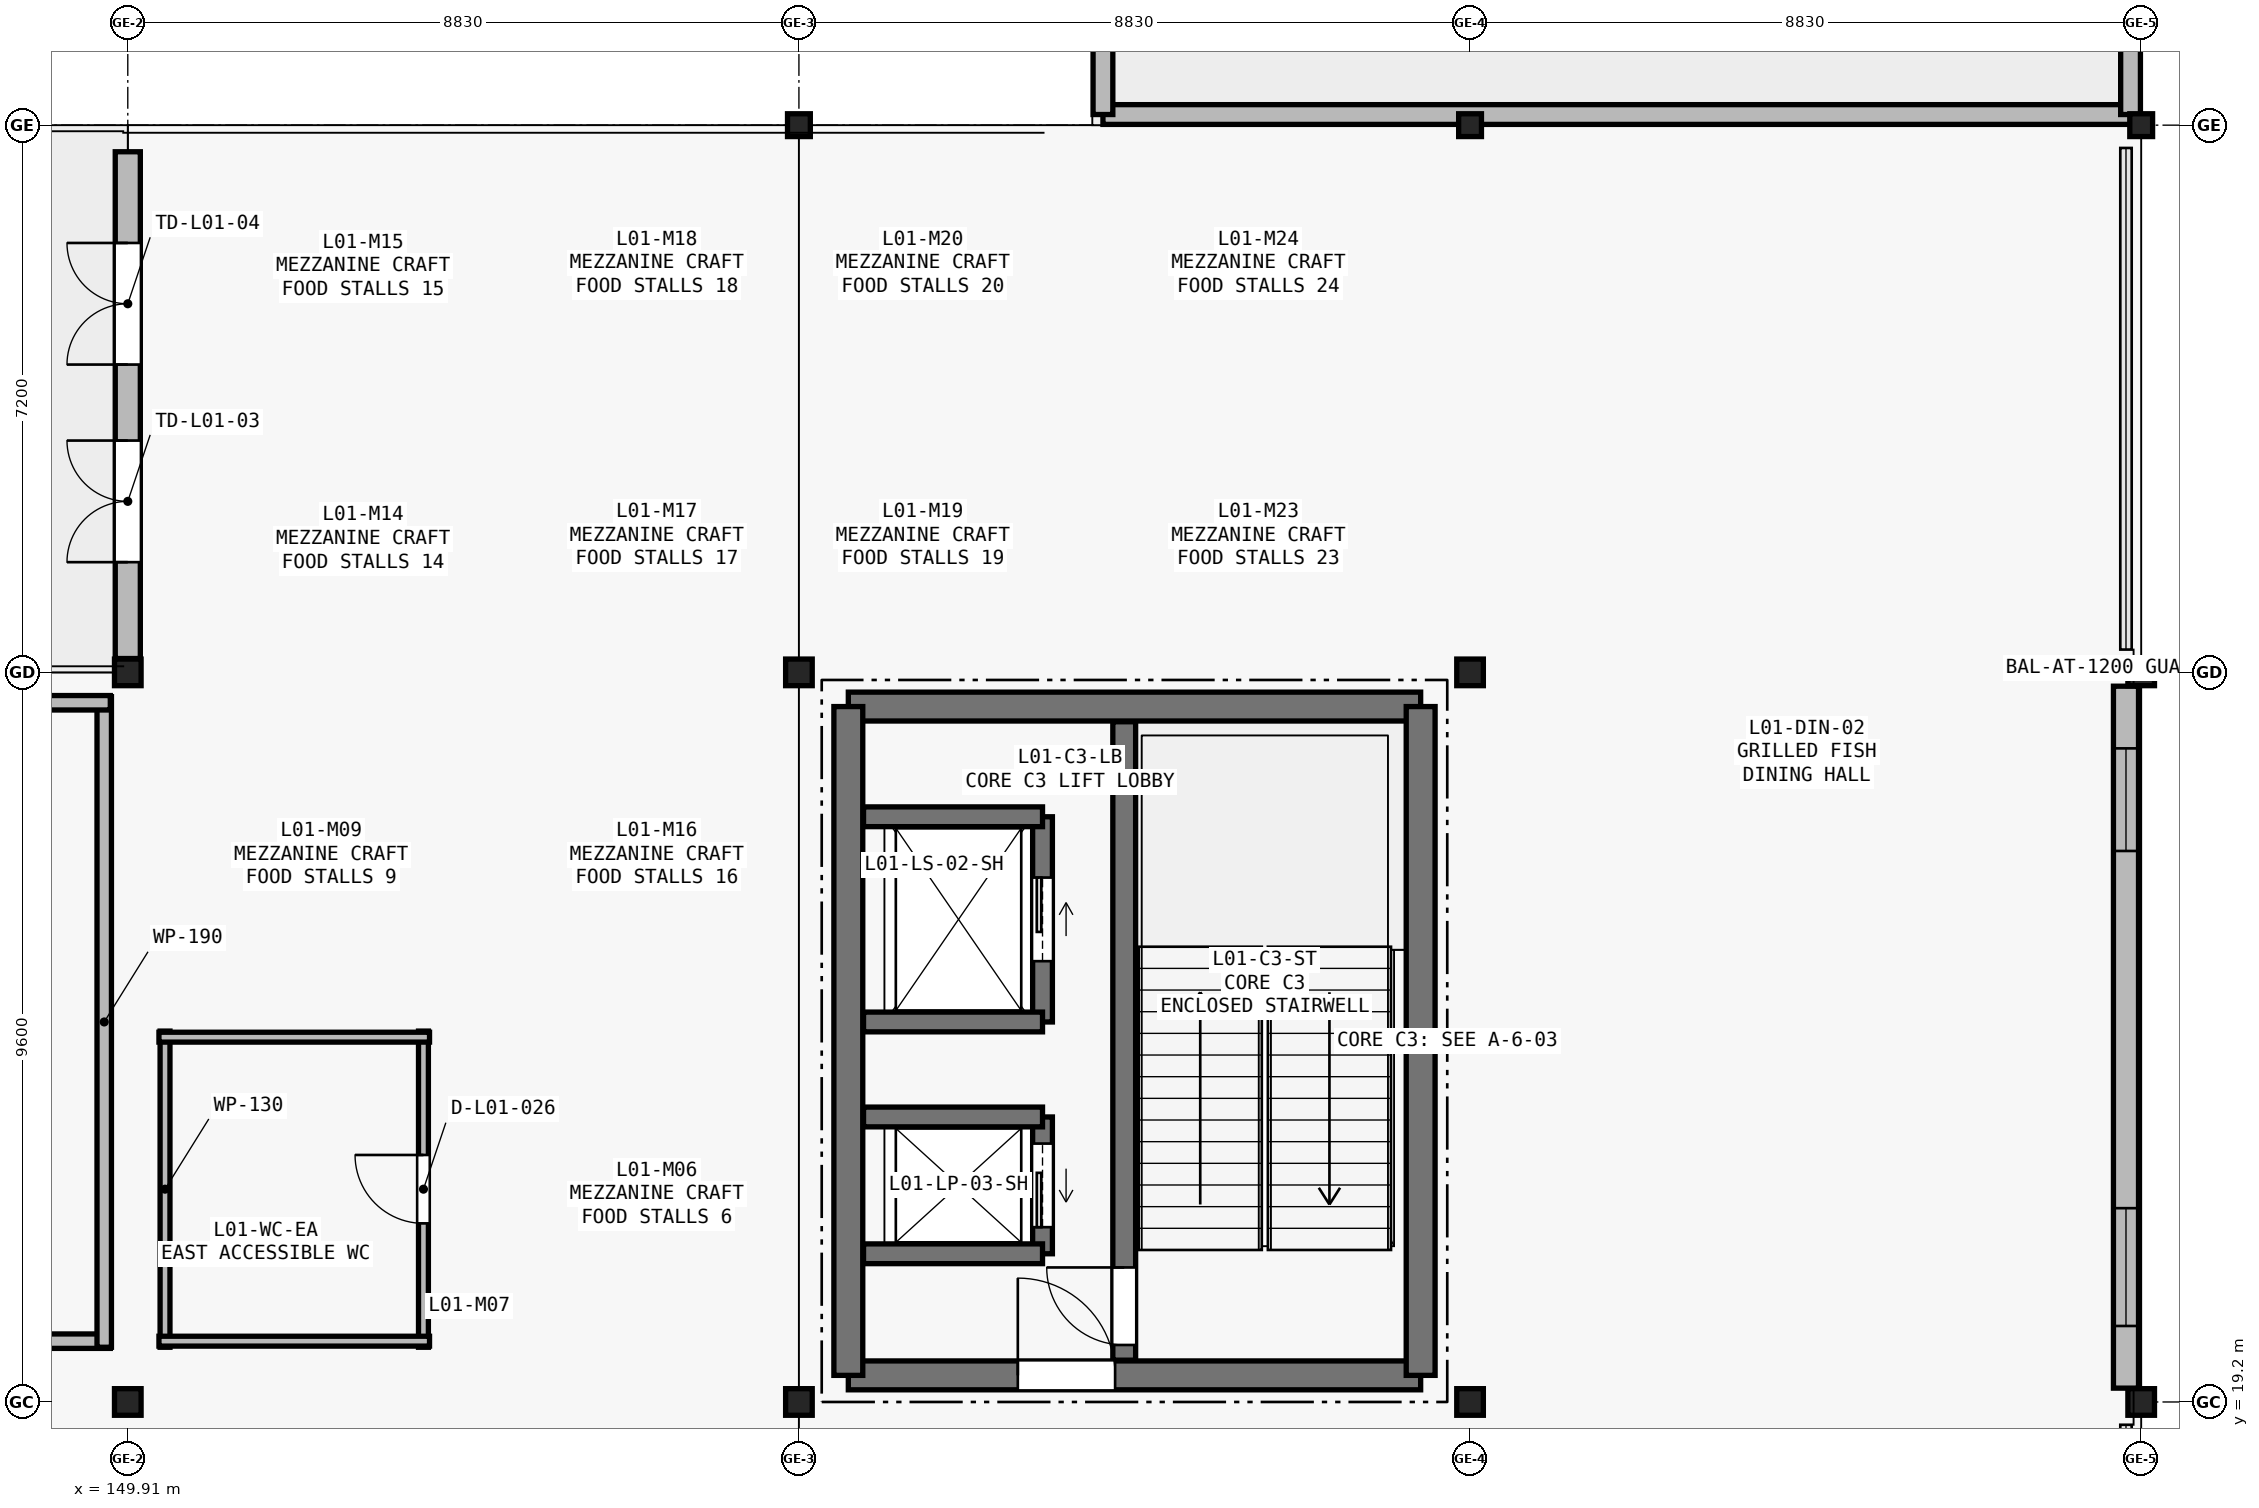
"""IFC4 building model, lengths in metres.
Left out: names, types, materials, properties, quantities, classifications, styles, units other than length and angle.
Written with IfcOpenShell. Run it as: python <this file> out.ifc"""

import sys

from ifc_helpers import new_model, si_unit, direction, frame, frame_2d, origin, origin_2d, place, context, subcontext, project, spatial, rectangle, hollow_rectangle, i_section, extrude, element, fill, save


model = new_model("IFC4")
c1 = context("Model", 3, precision=1e-05, world=origin(), true_north=direction((0.0, 1.0)))
c2 = subcontext(c1, "Body", "Model", "MODEL_VIEW")
j1 = project(units=[si_unit("LENGTHUNIT", "METRE"), si_unit("PLANEANGLEUNIT", "RADIAN")], contexts=[c1])
p1 = place(None, origin())
s1 = spatial("IfcSite", under=j1, at=p1, CompositionType="ELEMENT")
p2 = place(p1, origin())
s2 = spatial("IfcBuilding", under=s1, at=p2, CompositionType="ELEMENT")
p3 = place(p2, frame((0.0, 0.0, 6.0)))
s3 = spatial("IfcBuildingStorey", under=s2, at=p3, CompositionType="ELEMENT", Elevation=6.0)
for number, where, z_axis, x_axis in (
    (1, (149.91, 19.2, 0.0), (0.0, 0.0, 1.0), (1.0, 0.0, 0.0)),
    (2, (149.91, 28.8, 0.0), (0.0, 0.0, 1.0), (1.0, 0.0, 0.0)),
    (3, (158.74, 19.2, 0.0), (0.0, 0.0, 1.0), (1.0, 0.0, 0.0)),
    (4, (158.74, 28.8, 0.0), (0.0, 0.0, 1.0), (1.0, 0.0, 0.0)),
):
    element("IfcColumn", number, at=place(p3, frame(where, z_axis=z_axis, x_axis=x_axis)), inside=s3, PredefinedType="COLUMN", context=c2, shape_type="SweptSolid", body=[
        extrude(i_section(OverallWidth=0.35, OverallDepth=0.35, WebThickness=0.012, FlangeThickness=0.019, FilletRadius=0.02, at=origin_2d()), origin(), (0.0, 0.0, 1.0), 4.8),
    ])
p4 = place(p3, frame((158.74, 36.0, 0.0), z_axis=(0.0, 0.0, 1.0), x_axis=(1.0, 0.0, 0.0)))
e5 = element("IfcColumn", 5, at=p4, inside=s3, PredefinedType="COLUMN", context=c2, shape_type="SweptSolid", body=[
    extrude(hollow_rectangle(XDim=0.3, YDim=0.3, WallThickness=0.01, InnerFilletRadius=0.01, OuterFilletRadius=0.016, at=origin_2d()), origin(), (0.0, 0.0, 1.0), 4.8),
])
for number, where, z_axis, x_axis in (
    (6, (167.57, 19.2, 0.0), (0.0, 0.0, 1.0), (1.0, 0.0, 0.0)),
    (7, (167.57, 28.8, 0.0), (0.0, 0.0, 1.0), (1.0, 0.0, 0.0)),
):
    element("IfcColumn", number, at=place(p3, frame(where, z_axis=z_axis, x_axis=x_axis)), inside=s3, PredefinedType="COLUMN", context=c2, shape_type="SweptSolid", body=[
        extrude(i_section(OverallWidth=0.35, OverallDepth=0.35, WebThickness=0.012, FlangeThickness=0.019, FilletRadius=0.02, at=origin_2d()), origin(), (0.0, 0.0, 1.0), 4.8),
    ])
p5 = place(p3, frame((167.57, 36.0, 0.0), z_axis=(0.0, 0.0, 1.0), x_axis=(1.0, 0.0, 0.0)))
e8 = element("IfcColumn", 8, at=p5, inside=s3, PredefinedType="COLUMN", context=c2, shape_type="SweptSolid", body=[
    extrude(hollow_rectangle(XDim=0.3, YDim=0.3, WallThickness=0.01, InnerFilletRadius=0.01, OuterFilletRadius=0.016, at=origin_2d()), origin(), (0.0, 0.0, 1.0), 4.8),
])
for number, where, z_axis, x_axis in (
    (9, (176.4, 19.2, 0.0), (0.0, 0.0, 1.0), (1.0, 0.0, 0.0)),
    (10, (176.4, 28.8, 0.0), (0.0, 0.0, 1.0), (1.0, 0.0, 0.0)),
):
    element("IfcColumn", number, at=place(p3, frame(where, z_axis=z_axis, x_axis=x_axis)), inside=s3, PredefinedType="COLUMN", context=c2, shape_type="SweptSolid", body=[
        extrude(i_section(OverallWidth=0.35, OverallDepth=0.35, WebThickness=0.012, FlangeThickness=0.019, FilletRadius=0.02, at=origin_2d()), origin(), (0.0, 0.0, 1.0), 4.8),
    ])
p6 = place(p3, frame((176.4, 36.0, 0.0), z_axis=(0.0, 0.0, 1.0), x_axis=(1.0, 0.0, 0.0)))
e11 = element("IfcColumn", 11, at=p6, inside=s3, PredefinedType="COLUMN", context=c2, shape_type="SweptSolid", body=[
    extrude(hollow_rectangle(XDim=0.3, YDim=0.3, WallThickness=0.01, InnerFilletRadius=0.01, OuterFilletRadius=0.016, at=origin_2d()), origin(), (0.0, 0.0, 1.0), 4.8),
])
p7 = place(p3, frame((176.2, 28.618, 0.0), z_axis=(0.0, 0.0, 1.0), x_axis=(0.0, -1.0, 0.0)))
e12 = element("IfcWall", 12, at=p7, inside=s3, PredefinedType="SOLIDWALL", context=c2, shape_type="SweptSolid", body=[
    extrude(rectangle(XDim=9.236, YDim=0.33, at=frame_2d((4.618, 0.0))), origin(), (0.0, 0.0, 1.0), 3.95),
])
p8 = place(p7, frame((0.818, 0.0, 0.95)))
e13 = element("IfcOpeningElement", 13, at=p8, cuts=e12, PredefinedType="OPENING", context=c2, shape_type="SweptSolid", body=[
    extrude(rectangle(XDim=1.35, YDim=1.65, at=frame_2d((0.675, 0.825))), frame((0.0, 0.175, 0.0), z_axis=(0.0, -1.0, 0.0), x_axis=(1.0, 0.0, 0.0)), (0.0, 0.0, 1.0), 0.35),
])
p9 = place(p7, frame((6.868, 0.0, 0.95)))
e14 = element("IfcOpeningElement", 14, at=p9, cuts=e12, PredefinedType="OPENING", context=c2, shape_type="SweptSolid", body=[
    extrude(rectangle(XDim=1.55, YDim=1.65, at=frame_2d((0.775, 0.825))), frame((0.0, 0.175, 0.0), z_axis=(0.0, -1.0, 0.0), x_axis=(1.0, 0.0, 0.0)), (0.0, 0.0, 1.0), 0.35),
])
p10 = place(p3, frame((149.91, 28.982, 0.0), z_axis=(0.0, 0.0, 1.0), x_axis=(0.0, 1.0, 0.0)))
e15 = element("IfcWall", 15, at=p10, inside=s3, PredefinedType="SOLIDWALL", context=c2, shape_type="SweptSolid", body=[
    extrude(rectangle(XDim=6.668, YDim=0.33, at=frame_2d((3.334, 0.0))), origin(), (0.0, 0.0, 1.0), 3.95),
])
p11 = place(p10, frame((1.268, 0.0, 0.0)))
e16 = element("IfcOpeningElement", 16, at=p11, cuts=e15, PredefinedType="OPENING", context=c2, shape_type="SweptSolid", body=[
    extrude(rectangle(XDim=1.6, YDim=2.15, at=frame_2d((0.8, 1.075))), frame((0.0, 0.175, 0.0), z_axis=(0.0, -1.0, 0.0), x_axis=(1.0, 0.0, 0.0)), (0.0, 0.0, 1.0), 0.35),
])
p12 = place(p10, frame((3.868, 0.0, 0.0)))
e17 = element("IfcOpeningElement", 17, at=p12, cuts=e15, PredefinedType="OPENING", context=c2, shape_type="SweptSolid", body=[
    extrude(rectangle(XDim=1.6, YDim=2.15, at=frame_2d((0.8, 1.075))), frame((0.0, 0.175, 0.0), z_axis=(0.0, -1.0, 0.0), x_axis=(1.0, 0.0, 0.0)), (0.0, 0.0, 1.0), 0.35),
])
p13 = place(p3, frame((162.74, 36.14, 0.01), z_axis=(0.0, 0.0, 1.0), x_axis=(1.0, 0.0, 0.0)))
e18 = element("IfcWall", 18, at=p13, inside=s3, PredefinedType="PARAPET", context=c2, shape_type="SweptSolid", body=[
    extrude(rectangle(XDim=13.52, YDim=0.26, at=frame_2d((6.76, 0.0))), origin(), (0.0, 0.0, 1.0), 1.15),
])
for number, where, z_axis, x_axis in (
    (19, (176.26, 36.14, 0.01), (0.0, 0.0, 1.0), (0.0, 1.0, 0.0)),
    (20, (162.74, 77.86, 0.01), (0.0, 0.0, 1.0), (0.0, -1.0, 0.0)),
):
    element("IfcWall", number, at=place(p3, frame(where, z_axis=z_axis, x_axis=x_axis)), inside=s3, PredefinedType="PARAPET", context=c2, shape_type="SweptSolid", body=[
        extrude(rectangle(XDim=41.72, YDim=0.26, at=frame_2d((20.86, 0.0))), origin(), (0.0, 0.0, 1.0), 1.15),
    ])
p14 = place(p3, frame((159.39, 19.55, 0.0), z_axis=(0.0, 0.0, 1.0), x_axis=(1.0, 0.0, 0.0)))
e21 = element("IfcWall", 21, at=p14, inside=s3, PredefinedType="SHEAR", context=c2, shape_type="SweptSolid", body=[
    extrude(rectangle(XDim=7.53, YDim=0.38, at=frame_2d((3.765, 0.0))), origin(), (0.0, 0.0, 1.0), 4.8),
])
p15 = place(p14, frame((2.23, 0.0, 0.0)))
e22 = element("IfcOpeningElement", 22, at=p15, cuts=e21, PredefinedType="OPENING", context=c2, shape_type="SweptSolid", body=[
    extrude(rectangle(XDim=1.28, YDim=2.15, at=frame_2d((0.64, 1.075))), frame((0.0, 0.2, 0.0), z_axis=(0.0, -1.0, 0.0), x_axis=(1.0, 0.0, 0.0)), (0.0, 0.0, 1.0), 0.4),
])
p16 = place(p3, frame((166.92, 28.35, 0.0), z_axis=(0.0, 0.0, 1.0), x_axis=(-1.0, 0.0, 0.0)))
e23 = element("IfcWall", 23, at=p16, inside=s3, PredefinedType="SHEAR", context=c2, shape_type="SweptSolid", body=[
    extrude(rectangle(XDim=7.53, YDim=0.38, at=frame_2d((3.765, 0.0))), origin(), (0.0, 0.0, 1.0), 4.8),
])
for number, where, z_axis, x_axis in (
    (24, (159.39, 28.35, 0.0), (0.0, 0.0, 1.0), (0.0, -1.0, 0.0)),
    (25, (166.92, 19.55, 0.0), (0.0, 0.0, 1.0), (0.0, 1.0, 0.0)),
):
    element("IfcWall", number, at=place(p3, frame(where, z_axis=z_axis, x_axis=x_axis)), inside=s3, PredefinedType="SHEAR", context=c2, shape_type="SweptSolid", body=[
        extrude(rectangle(XDim=8.8, YDim=0.38, at=frame_2d((4.4, 0.0))), origin(), (0.0, 0.0, 1.0), 4.8),
    ])
p17 = place(p3, frame((163.02, 19.75, 0.0), z_axis=(0.0, 0.0, 1.0), x_axis=(0.0, 1.0, 0.0)))
e26 = element("IfcWall", 26, at=p17, inside=s3, PredefinedType="SHEAR", context=c2, shape_type="SweptSolid", body=[
    extrude(rectangle(XDim=8.4, YDim=0.3, at=frame_2d((4.2, 0.0))), origin(), (0.0, 0.0, 1.0), 4.8),
])
p18 = place(p17, frame((0.2, 0.0, 0.0)))
e27 = element("IfcOpeningElement", 27, at=p18, cuts=e26, PredefinedType="OPENING", context=c2, shape_type="SweptSolid", body=[
    extrude(rectangle(XDim=1.02, YDim=2.1, at=frame_2d((0.51, 1.05))), frame((0.0, 0.16, 0.0), z_axis=(0.0, -1.0, 0.0), x_axis=(1.0, 0.0, 0.0)), (0.0, 0.0, 1.0), 0.32),
])
p19 = place(p3, frame((161.945, 21.15, 0.0), z_axis=(0.0, 0.0, 1.0), x_axis=(0.0, 1.0, 0.0)))
e28 = element("IfcWall", 28, at=p19, inside=s3, PredefinedType="SHEAR", context=c2, shape_type="SweptSolid", body=[
    extrude(rectangle(XDim=1.8, YDim=0.26, at=frame_2d((0.9, 0.0))), origin(), (0.0, 0.0, 1.0), 4.8),
])
p20 = place(p19, frame((0.35, 0.0, 0.0)))
e29 = element("IfcOpeningElement", 29, at=p20, cuts=e28, PredefinedType="OPENING", context=c2, shape_type="SweptSolid", body=[
    extrude(rectangle(XDim=1.1, YDim=2.15, at=frame_2d((0.55, 1.075))), frame((0.0, 0.14, 0.0), z_axis=(0.0, -1.0, 0.0), x_axis=(1.0, 0.0, 0.0)), (0.0, 0.0, 1.0), 0.28),
])
for number, where, z_axis, x_axis in (
    (30, (159.59, 21.15, 0.0), (0.0, 0.0, 1.0), (1.0, 0.0, 0.0)),
    (31, (159.59, 22.95, 0.0), (0.0, 0.0, 1.0), (1.0, 0.0, 0.0)),
):
    element("IfcWall", number, at=place(p3, frame(where, z_axis=z_axis, x_axis=x_axis)), inside=s3, PredefinedType="SHEAR", context=c2, shape_type="SweptSolid", body=[
        extrude(rectangle(XDim=2.355, YDim=0.26, at=frame_2d((1.177, 0.0))), origin(), (0.0, 0.0, 1.0), 4.8),
    ])
p21 = place(p3, frame((161.945, 24.2, 0.0), z_axis=(0.0, 0.0, 1.0), x_axis=(0.0, 1.0, 0.0)))
e32 = element("IfcWall", 32, at=p21, inside=s3, PredefinedType="SHEAR", context=c2, shape_type="SweptSolid", body=[
    extrude(rectangle(XDim=2.7, YDim=0.26, at=frame_2d((1.35, 0.0))), origin(), (0.0, 0.0, 1.0), 4.8),
])
p22 = place(p21, frame((0.8, 0.0, 0.0)))
e33 = element("IfcOpeningElement", 33, at=p22, cuts=e32, PredefinedType="OPENING", context=c2, shape_type="SweptSolid", body=[
    extrude(rectangle(XDim=1.1, YDim=2.15, at=frame_2d((0.55, 1.075))), frame((0.0, 0.14, 0.0), z_axis=(0.0, -1.0, 0.0), x_axis=(1.0, 0.0, 0.0)), (0.0, 0.0, 1.0), 0.28),
])
for number, where, z_axis, x_axis in (
    (34, (159.59, 24.2, 0.0), (0.0, 0.0, 1.0), (1.0, 0.0, 0.0)),
    (35, (159.59, 26.9, 0.0), (0.0, 0.0, 1.0), (1.0, 0.0, 0.0)),
):
    element("IfcWall", number, at=place(p3, frame(where, z_axis=z_axis, x_axis=x_axis)), inside=s3, PredefinedType="SHEAR", context=c2, shape_type="SweptSolid", body=[
        extrude(rectangle(XDim=2.355, YDim=0.26, at=frame_2d((1.177, 0.0))), origin(), (0.0, 0.0, 1.0), 4.8),
    ])
p23 = place(p3, frame((153.8, 19.92, 0.0), z_axis=(0.0, 0.0, 1.0), x_axis=(0.0, 1.0, 0.0)))
e36 = element("IfcWall", 36, at=p23, inside=s3, PredefinedType="PARTITIONING", context=c2, shape_type="SweptSolid", body=[
    extrude(rectangle(XDim=4.16, YDim=0.13, at=frame_2d((2.08, 0.0))), origin(), (0.0, 0.0, 1.0), 4.32),
])
p24 = place(p23, frame((1.63, 0.0, 0.0)))
e37 = element("IfcOpeningElement", 37, at=p24, cuts=e36, PredefinedType="OPENING", context=c2, shape_type="SweptSolid", body=[
    extrude(rectangle(XDim=0.9, YDim=2.36, at=frame_2d((0.45, 1.18))), frame((0.0, 0.075, 0.0), z_axis=(0.0, -1.0, 0.0), x_axis=(1.0, 0.0, 0.0)), (0.0, 0.0, 1.0), 0.15),
])
p25 = place(p3, frame((150.4, 24.08, 0.0), z_axis=(0.0, 0.0, 1.0), x_axis=(0.0, -1.0, 0.0)))
e38 = element("IfcWall", 38, at=p25, inside=s3, PredefinedType="PARTITIONING", context=c2, shape_type="SweptSolid", body=[
    extrude(rectangle(XDim=4.16, YDim=0.13, at=frame_2d((2.08, 0.0))), origin(), (0.0, 0.0, 1.0), 4.32),
])
for number, where, z_axis, x_axis in (
    (39, (150.32, 20.0, 0.0), (0.0, 0.0, 1.0), (1.0, 0.0, 0.0)),
    (40, (153.88, 24.0, 0.0), (0.0, 0.0, 1.0), (-1.0, 0.0, 0.0)),
):
    element("IfcWall", number, at=place(p3, frame(where, z_axis=z_axis, x_axis=x_axis)), inside=s3, PredefinedType="PARTITIONING", context=c2, shape_type="SweptSolid", body=[
        extrude(rectangle(XDim=3.56, YDim=0.13, at=frame_2d((1.78, 0.0))), origin(), (0.0, 0.0, 1.0), 4.32),
    ])
p26 = place(p3, frame((141.42, 20.0, 0.0), z_axis=(0.0, 0.0, 1.0), x_axis=(1.0, 0.0, 0.0)))
e41 = element("IfcWall", 41, at=p26, inside=s3, PredefinedType="PARTITIONING", context=c2, shape_type="SweptSolid", body=[
    extrude(rectangle(XDim=8.26, YDim=0.19, at=frame_2d((4.13, 0.0))), origin(), (0.0, 0.0, 1.0), 4.32),
])
p27 = place(p26, frame((3.23, 0.0, 0.0)))
e42 = element("IfcOpeningElement", 42, at=p27, cuts=e41, PredefinedType="OPENING", context=c2, shape_type="SweptSolid", body=[
    extrude(rectangle(XDim=1.8, YDim=2.42, at=frame_2d((0.9, 1.21))), frame((0.0, 0.105, 0.0), z_axis=(0.0, -1.0, 0.0), x_axis=(1.0, 0.0, 0.0)), (0.0, 0.0, 1.0), 0.21),
])
p28 = place(p3, frame((149.6, 19.92, 0.0), z_axis=(0.0, 0.0, 1.0), x_axis=(0.0, 1.0, 0.0)))
e43 = element("IfcWall", 43, at=p28, inside=s3, PredefinedType="PARTITIONING", context=c2, shape_type="SweptSolid", body=[
    extrude(rectangle(XDim=8.56, YDim=0.19, at=frame_2d((4.28, 0.0))), origin(), (0.0, 0.0, 1.0), 4.32),
])
p29 = place(p3, frame((149.68, 28.4, 0.0), z_axis=(0.0, 0.0, 1.0), x_axis=(-1.0, 0.0, 0.0)))
e44 = element("IfcWall", 44, at=p29, inside=s3, PredefinedType="PARTITIONING", context=c2, shape_type="SweptSolid", body=[
    extrude(rectangle(XDim=8.26, YDim=0.19, at=frame_2d((4.13, 0.0))), origin(), (0.0, 0.0, 1.0), 4.32),
])
p30 = place(p8, origin())
e45 = element("IfcWindow", 45, at=p30, inside=s3, PartitioningType="SINGLE_PANEL", PredefinedType="WINDOW", context=c2, shape_type="SweptSolid", body=[
    extrude(rectangle(XDim=1.35, YDim=1.65, at=frame_2d((0.675, 0.825))), frame((0.0, 0.03, 0.0), z_axis=(0.0, -1.0, 0.0), x_axis=(1.0, 0.0, 0.0)), (0.0, 0.0, 1.0), 0.06),
])
fill(e13, e45)
p31 = place(p9, origin())
e46 = element("IfcWindow", 46, at=p31, inside=s3, PartitioningType="SINGLE_PANEL", PredefinedType="WINDOW", context=c2, shape_type="SweptSolid", body=[
    extrude(rectangle(XDim=1.55, YDim=1.65, at=frame_2d((0.775, 0.825))), frame((0.0, 0.03, 0.0), z_axis=(0.0, -1.0, 0.0), x_axis=(1.0, 0.0, 0.0)), (0.0, 0.0, 1.0), 0.06),
])
fill(e14, e46)
p32 = place(p11, origin())
e47 = element("IfcDoor", 47, at=p32, inside=s3, OperationType="DOUBLE_DOOR_SINGLE_SWING", PredefinedType="DOOR", context=c2, shape_type="SweptSolid", body=[
    extrude(rectangle(XDim=1.6, YDim=2.15, at=frame_2d((0.8, 1.075))), frame((0.0, 0.025, 0.0), z_axis=(0.0, -1.0, 0.0), x_axis=(1.0, 0.0, 0.0)), (0.0, 0.0, 1.0), 0.05),
])
fill(e16, e47)
p33 = place(p12, origin())
e48 = element("IfcDoor", 48, at=p33, inside=s3, OperationType="DOUBLE_DOOR_SINGLE_SWING", PredefinedType="DOOR", context=c2, shape_type="SweptSolid", body=[
    extrude(rectangle(XDim=1.6, YDim=2.15, at=frame_2d((0.8, 1.075))), frame((0.0, 0.025, 0.0), z_axis=(0.0, -1.0, 0.0), x_axis=(1.0, 0.0, 0.0)), (0.0, 0.0, 1.0), 0.05),
])
fill(e17, e48)
p34 = place(p15, origin())
e49 = element("IfcDoor", 49, at=p34, inside=s3, OperationType="SINGLE_SWING_LEFT", PredefinedType="DOOR", context=c2, shape_type="SweptSolid", body=[
    extrude(rectangle(XDim=1.28, YDim=2.15, at=frame_2d((0.64, 1.075))), frame((0.0, 0.025, 0.0), z_axis=(0.0, -1.0, 0.0), x_axis=(1.0, 0.0, 0.0)), (0.0, 0.0, 1.0), 0.05),
])
fill(e22, e49)
p35 = place(p18, origin())
e50 = element("IfcDoor", 50, at=p35, inside=s3, OperationType="SINGLE_SWING_RIGHT", PredefinedType="DOOR", context=c2, shape_type="SweptSolid", body=[
    extrude(rectangle(XDim=1.02, YDim=2.1, at=frame_2d((0.51, 1.05))), frame((0.0, 0.025, 0.0), z_axis=(0.0, -1.0, 0.0), x_axis=(1.0, 0.0, 0.0)), (0.0, 0.0, 1.0), 0.05),
])
fill(e27, e50)
p36 = place(p20, origin())
e51 = element("IfcDoor", 51, at=p36, inside=s3, OperationType="SLIDING_TO_LEFT", PredefinedType="DOOR", context=c2, shape_type="SweptSolid", body=[
    extrude(rectangle(XDim=1.1, YDim=2.15, at=frame_2d((0.55, 1.075))), frame((0.0, 0.025, 0.0), z_axis=(0.0, -1.0, 0.0), x_axis=(1.0, 0.0, 0.0)), (0.0, 0.0, 1.0), 0.05),
])
fill(e29, e51)
p37 = place(p22, origin())
e52 = element("IfcDoor", 52, at=p37, inside=s3, OperationType="SLIDING_TO_RIGHT", PredefinedType="DOOR", context=c2, shape_type="SweptSolid", body=[
    extrude(rectangle(XDim=1.1, YDim=2.15, at=frame_2d((0.55, 1.075))), frame((0.0, 0.025, 0.0), z_axis=(0.0, -1.0, 0.0), x_axis=(1.0, 0.0, 0.0)), (0.0, 0.0, 1.0), 0.05),
])
fill(e33, e52)
p38 = place(p24, origin())
e53 = element("IfcDoor", 53, at=p38, inside=s3, OperationType="SINGLE_SWING_RIGHT", PredefinedType="DOOR", context=c2, shape_type="SweptSolid", body=[
    extrude(rectangle(XDim=0.9, YDim=2.36, at=frame_2d((0.45, 1.18))), frame((0.0, 0.025, 0.0), z_axis=(0.0, -1.0, 0.0), x_axis=(1.0, 0.0, 0.0)), (0.0, 0.0, 1.0), 0.05),
])
fill(e37, e53)
save(model, sys.argv[1])
